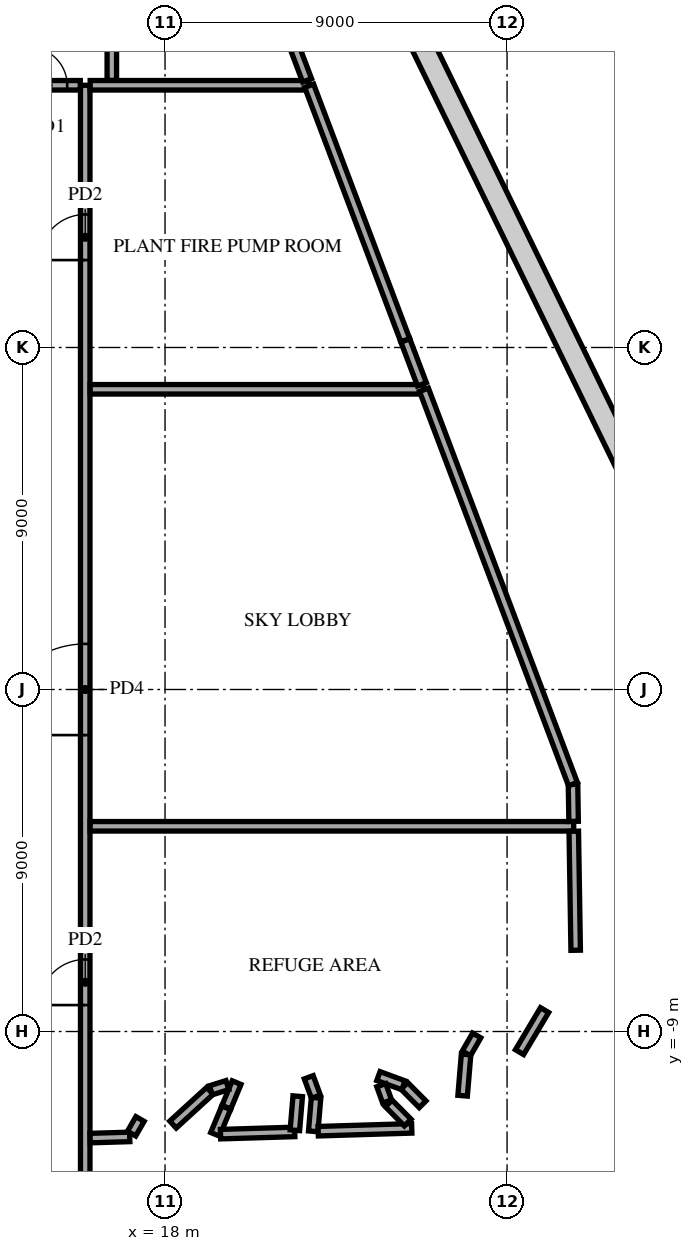
"""IFC4 building model, lengths in metres.
Left out: names, types, materials, properties, quantities, classifications, styles, units other than length and angle.
Written with IfcOpenShell. Run it as: python <this file> out.ifc"""

import sys

from ifc_helpers import new_model, si_unit, direction, frame, frame_2d, origin, place, context, subcontext, project, spatial, rectangle, extrude, element, fill, save


model = new_model("IFC4")
c1 = context("Model", 3, precision=1e-05, world=origin(), true_north=direction((0.0, 1.0)))
c2 = subcontext(c1, "Body", "Model", "MODEL_VIEW")
j1 = project(units=[si_unit("LENGTHUNIT", "METRE"), si_unit("PLANEANGLEUNIT", "RADIAN")], contexts=[c1])
p1 = place(None, origin())
s1 = spatial("IfcSite", under=j1, at=p1, CompositionType="ELEMENT")
p2 = place(p1, origin())
s2 = spatial("IfcBuilding", under=s1, at=p2, CompositionType="ELEMENT")
p3 = place(p2, frame((0.0, 0.0, 130.1)))
s3 = spatial("IfcBuildingStorey", under=s2, at=p3, CompositionType="ELEMENT", Elevation=130.1)
p4 = place(p3, frame((15.9, -13.805, 0.0), z_axis=(0.0, 0.0, 1.0), x_axis=(0.0, 1.0, 0.0)))
e1 = element("IfcWall", 1, at=p4, inside=s3, PredefinedType="PARTITIONING", context=c2, shape_type="SweptSolid", body=[
    extrude(rectangle(XDim=29.705, YDim=0.25, at=frame_2d((14.852, 0.0))), origin(), (0.0, 0.0, 1.0), 4.08),
])
p5 = place(p4, frame((25.105, 0.0, 0.0)))
e2 = element("IfcOpeningElement", 2, at=p5, cuts=e1, PredefinedType="OPENING", context=c2, shape_type="SweptSolid", body=[
    extrude(rectangle(XDim=1.2, YDim=2.1, at=frame_2d((0.6, 1.05))), frame((0.0, 0.135, 0.0), z_axis=(0.0, -1.0, 0.0), x_axis=(1.0, 0.0, 0.0)), (0.0, 0.0, 1.0), 0.27),
])
p6 = place(p4, frame((12.605, 0.0, 0.0)))
e3 = element("IfcOpeningElement", 3, at=p6, cuts=e1, PredefinedType="OPENING", context=c2, shape_type="SweptSolid", body=[
    extrude(rectangle(XDim=2.4, YDim=2.4, at=frame_2d((1.2, 1.2))), frame((0.0, 0.135, 0.0), z_axis=(0.0, -1.0, 0.0), x_axis=(1.0, 0.0, 0.0)), (0.0, 0.0, 1.0), 0.27),
])
p7 = place(p4, frame((5.5, 0.0, 0.0)))
e4 = element("IfcOpeningElement", 4, at=p7, cuts=e1, PredefinedType="OPENING", context=c2, shape_type="SweptSolid", body=[
    extrude(rectangle(XDim=1.2, YDim=2.1, at=frame_2d((0.6, 1.05))), frame((0.0, 0.135, 0.0), z_axis=(0.0, -1.0, 0.0), x_axis=(1.0, 0.0, 0.0)), (0.0, 0.0, 1.0), 0.27),
])
p8 = place(p3, frame((16.03, -11.805, 0.0), z_axis=(0.0, 0.0, 1.0), x_axis=(0.999542468894, 0.030246534949, 0.0)))
e5 = element("IfcWall", 5, at=p8, inside=s3, PredefinedType="PARTITIONING", context=c2, shape_type="SweptSolid", body=[
    extrude(rectangle(XDim=1.041, YDim=0.25, at=frame_2d((0.521, 0.0))), origin(), (0.0, 0.0, 1.0), 4.63),
])
p9 = place(p3, frame((19.318, -11.706, 0.0), z_axis=(0.0, 0.0, 1.0), x_axis=(0.383813679538, 0.923410558419, 0.0)))
e6 = element("IfcWall", 6, at=p9, inside=s3, PredefinedType="PARTITIONING", context=c2, shape_type="SweptSolid", body=[
    extrude(rectangle(XDim=0.757, YDim=0.25, at=frame_2d((0.378, 0.0))), origin(), (0.0, 0.0, 1.0), 5.2),
])
p10 = place(p3, frame((19.46, -11.701, 0.0), z_axis=(0.0, 0.0, 1.0), x_axis=(0.999542439642, 0.030247501612, 0.0)))
e7 = element("IfcWall", 7, at=p10, inside=s3, PredefinedType="PARTITIONING", context=c2, shape_type="SweptSolid", body=[
    extrude(rectangle(XDim=1.953, YDim=0.25, at=frame_2d((0.977, 0.0))), origin(), (0.0, 0.0, 1.0), 4.63),
])
p11 = place(p3, frame((21.9, -11.627, 0.0), z_axis=(0.0, 0.0, 1.0), x_axis=(0.083683339476, 0.99649239771, 0.0)))
e8 = element("IfcWall", 8, at=p11, inside=s3, PredefinedType="PARTITIONING", context=c2, shape_type="SweptSolid", body=[
    extrude(rectangle(XDim=0.887, YDim=0.25, at=frame_2d((0.443, 0.0))), origin(), (0.0, 0.0, 1.0), 5.2),
])
p12 = place(p3, frame((22.031, -11.623, 0.0), z_axis=(0.0, 0.0, 1.0), x_axis=(0.999545895718, 0.03013307738, 0.0)))
e9 = element("IfcWall", 9, at=p12, inside=s3, PredefinedType="PARTITIONING", context=c2, shape_type="SweptSolid", body=[
    extrude(rectangle(XDim=2.463, YDim=0.25, at=frame_2d((1.231, 0.0))), origin(), (0.0, 0.0, 1.0), 5.2),
])
p13 = place(p3, frame((17.12, -11.687, 0.0), z_axis=(0.0, 0.0, 1.0), x_axis=(0.498150847944, 0.867090383232, 0.0)))
e10 = element("IfcWall", 10, at=p13, inside=s3, PredefinedType="PARTITIONING", context=c2, shape_type="SweptSolid", body=[
    extrude(rectangle(XDim=0.444, YDim=0.25, at=frame_2d((0.222, 0.0))), origin(), (0.0, 0.0, 1.0), 5.2),
])
p14 = place(p3, frame((19.614, -10.993, 0.0), z_axis=(0.0, 0.0, 1.0), x_axis=(0.383898575086, 0.923375267184, 0.0)))
e11 = element("IfcWall", 11, at=p14, inside=s3, PredefinedType="PARTITIONING", context=c2, shape_type="SweptSolid", body=[
    extrude(rectangle(XDim=0.701, YDim=0.25, at=frame_2d((0.351, 0.0))), origin(), (0.0, 0.0, 1.0), 5.2),
])
p15 = place(p3, frame((24.298, -10.431, 0.0), z_axis=(0.0, 0.0, 1.0), x_axis=(0.704233858662, -0.709968078377, 0.0)))
e12 = element("IfcWall", 12, at=p15, inside=s3, PredefinedType="PARTITIONING", context=c2, shape_type="SweptSolid", body=[
    extrude(rectangle(XDim=0.681, YDim=0.25, at=frame_2d((0.341, 0.0))), origin(), (0.0, 0.0, 1.0), 5.2),
])
p16 = place(p3, frame((23.887, -10.893, 0.0), z_axis=(0.0, 0.0, 1.0), x_axis=(0.704347371504, -0.709855464341, 0.0)))
e13 = element("IfcWall", 13, at=p16, inside=s3, PredefinedType="PARTITIONING", context=c2, shape_type="SweptSolid", body=[
    extrude(rectangle(XDim=0.709, YDim=0.25, at=frame_2d((0.354, 0.0))), origin(), (0.0, 0.0, 1.0), 5.2),
])
p17 = place(p3, frame((21.782, -10.204, 0.0), z_axis=(0.0, 0.0, 1.0), x_axis=(0.34516449371, -0.938542205914, 0.0)))
e14 = element("IfcWall", 14, at=p17, inside=s3, PredefinedType="PARTITIONING", context=c2, shape_type="SweptSolid", body=[
    extrude(rectangle(XDim=0.544, YDim=0.25, at=frame_2d((0.272, 0.0))), origin(), (0.0, 0.0, 1.0), 5.2),
])
p18 = place(p3, frame((21.417, -11.598, 0.0), z_axis=(0.0, 0.0, 1.0), x_axis=(0.083697651562, 0.996491195708, 0.0)))
e15 = element("IfcWall", 15, at=p18, inside=s3, PredefinedType="PARTITIONING", context=c2, shape_type="SweptSolid", body=[
    extrude(rectangle(XDim=0.898, YDim=0.25, at=frame_2d((0.449, 0.0))), origin(), (0.0, 0.0, 1.0), 5.2),
])
p19 = place(p3, frame((18.21, -11.449, 0.0), z_axis=(0.0, 0.0, 1.0), x_axis=(0.738131795396, 0.674656544195, 0.0)))
e16 = element("IfcWall", 16, at=p19, inside=s3, PredefinedType="PARTITIONING", context=c2, shape_type="SweptSolid", body=[
    extrude(rectangle(XDim=1.315, YDim=0.25, at=frame_2d((0.658, 0.0))), origin(), (0.0, 0.0, 1.0), 5.2),
])
p20 = place(p3, frame((23.615, -10.173, 0.0), z_axis=(0.0, 0.0, 1.0), x_axis=(0.938372825887, -0.345624709238, 0.0)))
e17 = element("IfcWall", 17, at=p20, inside=s3, PredefinedType="PARTITIONING", context=c2, shape_type="SweptSolid", body=[
    extrude(rectangle(XDim=0.701, YDim=0.25, at=frame_2d((0.351, 0.0))), origin(), (0.0, 0.0, 1.0), 5.2),
])
for number, where, z_axis, x_axis in (
    (18, (19.206, -10.547, 0.0), (0.0, 0.0, 1.0), (0.954, 0.299, 0.0)),
    (19, (23.69, -10.413, 0.0), (0.0, 0.0, 1.0), (0.339, -0.941, 0.0)),
):
    element("IfcWall", number, at=place(p3, frame(where, z_axis=z_axis, x_axis=x_axis)), inside=s3, PredefinedType="PARTITIONING", context=c2, shape_type="SweptSolid", body=[
        extrude(rectangle(XDim=0.455, YDim=0.25, at=frame_2d((0.228, 0.0))), origin(), (0.0, 0.0, 1.0), 5.2),
    ])
p21 = place(p3, frame((25.831, -10.689, 0.0), z_axis=(0.0, 0.0, 1.0), x_axis=(0.083416627051, 0.996514759716, 0.0)))
e20 = element("IfcWall", 20, at=p21, inside=s3, PredefinedType="PARTITIONING", context=c2, shape_type="SweptSolid", body=[
    extrude(rectangle(XDim=1.089, YDim=0.25, at=frame_2d((0.544, 0.0))), origin(), (0.0, 0.0, 1.0), 5.2),
])
p22 = place(p3, frame((25.93, -9.576, 0.0), z_axis=(0.0, 0.0, 1.0), x_axis=(0.49642893732, 0.868077364174, 0.0)))
e21 = element("IfcWall", 21, at=p22, inside=s3, PredefinedType="PARTITIONING", context=c2, shape_type="SweptSolid", body=[
    extrude(rectangle(XDim=0.544, YDim=0.25, at=frame_2d((0.272, 0.0))), origin(), (0.0, 0.0, 1.0), 5.2),
])
p23 = place(p3, frame((27.328, -9.543, 0.0), z_axis=(0.0, 0.0, 1.0), x_axis=(0.511956966552, 0.859011096784, 0.0)))
e22 = element("IfcWall", 22, at=p23, inside=s3, PredefinedType="PARTITIONING", context=c2, shape_type="SweptSolid", body=[
    extrude(rectangle(XDim=1.288, YDim=0.25, at=frame_2d((0.644, 0.0))), origin(), (0.0, 0.0, 1.0), 5.2),
])
p24 = place(p3, frame((16.03, -3.6, 0.0), z_axis=(0.0, 0.0, 1.0), x_axis=(1.0, 0.0, 0.0)))
e23 = element("IfcWall", 23, at=p24, inside=s3, PredefinedType="PARTITIONING", context=c2, shape_type="SweptSolid", body=[
    extrude(rectangle(XDim=12.723, YDim=0.25, at=frame_2d((6.362, 0.0))), origin(), (0.0, 0.0, 1.0), 4.63),
])
p25 = place(p3, frame((28.755, -3.729, 0.0), z_axis=(0.0, 0.0, 1.0), x_axis=(0.016052798377, -0.99987114553, 0.0)))
e24 = element("IfcWall", 24, at=p25, inside=s3, PredefinedType="PARTITIONING", context=c2, shape_type="SweptSolid", body=[
    extrude(rectangle(XDim=3.133, YDim=0.25, at=frame_2d((1.566, 0.0))), origin(), (0.0, 0.0, 1.0), 4.08),
])
p26 = place(p3, frame((28.735, -2.496, 0.0), z_axis=(0.0, 0.0, 1.0), x_axis=(0.016034019694, -0.999871446843, 0.0)))
e25 = element("IfcWall", 25, at=p26, inside=s3, PredefinedType="PARTITIONING", context=c2, shape_type="SweptSolid", body=[
    extrude(rectangle(XDim=0.975, YDim=0.25, at=frame_2d((0.487, 0.0))), origin(), (0.0, 0.0, 1.0), 5.2),
])
p27 = place(p3, frame((16.03, 7.9, 0.0), z_axis=(0.0, 0.0, 1.0), x_axis=(1.0, 0.0, 0.0)))
e26 = element("IfcWall", 26, at=p27, inside=s3, PredefinedType="PARTITIONING", context=c2, shape_type="SweptSolid", body=[
    extrude(rectangle(XDim=8.779, YDim=0.25, at=frame_2d((4.389, 0.0))), origin(), (0.0, 0.0, 1.0), 5.2),
])
p28 = place(p3, frame((24.814, 7.887, 0.0), z_axis=(0.0, 0.0, 1.0), x_axis=(0.353334226632, -0.935497153545, 0.0)))
e27 = element("IfcWall", 27, at=p28, inside=s3, PredefinedType="PARTITIONING", context=c2, shape_type="SweptSolid", body=[
    extrude(rectangle(XDim=11.093, YDim=0.25, at=frame_2d((5.546, 0.0))), origin(), (0.0, 0.0, 1.0), 4.63),
])
p29 = place(p3, frame((24.323, 9.187, 0.0), z_axis=(0.0, 0.0, 1.0), x_axis=(0.353350663063, -0.935490945393, 0.0)))
e28 = element("IfcWall", 28, at=p29, inside=s3, PredefinedType="PARTITIONING", context=c2, shape_type="SweptSolid", body=[
    extrude(rectangle(XDim=1.237, YDim=0.25, at=frame_2d((0.618, 0.0))), origin(), (0.0, 0.0, 1.0), 5.2),
])
p30 = place(p3, frame((14.08, 15.9, 0.0), z_axis=(0.0, 0.0, 1.0), x_axis=(1.0, 0.0, 0.0)))
e29 = element("IfcWall", 29, at=p30, inside=s3, PredefinedType="PARTITIONING", context=c2, shape_type="SweptSolid", body=[
    extrude(rectangle(XDim=1.69, YDim=0.25, at=frame_2d((0.845, 0.0))), origin(), (0.0, 0.0, 1.0), 4.63),
])
p31 = place(p30, frame((0.345, 0.0, 0.0)))
e30 = element("IfcOpeningElement", 30, at=p31, cuts=e29, PredefinedType="OPENING", context=c2, shape_type="SweptSolid", body=[
    extrude(rectangle(XDim=1.0, YDim=2.1, at=frame_2d((0.5, 1.05))), frame((0.0, 0.135, 0.0), z_axis=(0.0, -1.0, 0.0), x_axis=(1.0, 0.0, 0.0)), (0.0, 0.0, 1.0), 0.27),
])
p32 = place(p3, frame((16.03, 15.9, 0.0), z_axis=(0.0, 0.0, 1.0), x_axis=(1.0, 0.0, 0.0)))
e31 = element("IfcWall", 31, at=p32, inside=s3, PredefinedType="PARTITIONING", context=c2, shape_type="SweptSolid", body=[
    extrude(rectangle(XDim=5.757, YDim=0.25, at=frame_2d((2.879, 0.0))), origin(), (0.0, 0.0, 1.0), 4.63),
])
p33 = place(p3, frame((21.792, 15.887, 0.0), z_axis=(0.0, 0.0, 1.0), x_axis=(0.353316978095, -0.935503668079, 0.0)))
e32 = element("IfcWall", 32, at=p33, inside=s3, PredefinedType="PARTITIONING", context=c2, shape_type="SweptSolid", body=[
    extrude(rectangle(XDim=7.157, YDim=0.25, at=frame_2d((3.578, 0.0))), origin(), (0.0, 0.0, 1.0), 4.63),
])
p34 = place(p3, frame((20.006, 20.616, 0.0), z_axis=(0.0, 0.0, 1.0), x_axis=(0.353332775747, -0.935497701538, 0.0)))
e33 = element("IfcWall", 33, at=p34, inside=s3, PredefinedType="PARTITIONING", context=c2, shape_type="SweptSolid", body=[
    extrude(rectangle(XDim=4.902, YDim=0.25, at=frame_2d((2.451, 0.0))), origin(), (0.0, 0.0, 1.0), 4.172),
])
p35 = place(p3, frame((16.6, 16.03, 0.0), z_axis=(0.0, 0.0, 1.0), x_axis=(0.0, 1.0, 0.0)))
e34 = element("IfcWall", 34, at=p35, inside=s3, PredefinedType="PARTITIONING", context=c2, shape_type="SweptSolid", body=[
    extrude(rectangle(XDim=6.567, YDim=0.25, at=frame_2d((3.283, 0.0))), origin(), (0.0, 0.0, 1.0), 4.63),
])
p36 = place(p35, frame((2.629, 0.0, 0.0)))
e35 = element("IfcOpeningElement", 35, at=p36, cuts=e34, PredefinedType="OPENING", context=c2, shape_type="SweptSolid", body=[
    extrude(rectangle(XDim=1.2, YDim=2.1, at=frame_2d((0.6, 1.05))), frame((0.0, 0.135, 0.0), z_axis=(0.0, -1.0, 0.0), x_axis=(1.0, 0.0, 0.0)), (0.0, 0.0, 1.0), 0.27),
])
p37 = place(p3, frame((36.722, -7.541, 0.0), z_axis=(0.0, 0.0, 1.0), x_axis=(-0.438370098475, 0.898794557596, 0.0)))
e36 = element("IfcWall", 36, at=p37, inside=s3, PredefinedType="STANDARD", context=c2, shape_type="SweptSolid", body=[
    extrude(rectangle(XDim=45.376, YDim=0.6, at=frame_2d((22.688, 0.0))), origin(), (0.0, 0.0, 1.0), 5.2),
])
p38 = place(p37, frame((1.163, 0.0, 0.6)))
e37 = element("IfcOpeningElement", 37, at=p38, cuts=e36, PredefinedType="OPENING", context=c2, shape_type="SweptSolid", body=[
    extrude(rectangle(XDim=2.1, YDim=4.15, at=frame_2d((1.05, 2.075))), frame((0.0, 0.31, 0.0), z_axis=(0.0, -1.0, 0.0), x_axis=(1.0, 0.0, 0.0)), (0.0, 0.0, 1.0), 0.62),
])
p39 = place(p37, frame((5.651, 0.0, 0.6)))
e38 = element("IfcOpeningElement", 38, at=p39, cuts=e36, PredefinedType="OPENING", context=c2, shape_type="SweptSolid", body=[
    extrude(rectangle(XDim=2.1, YDim=4.15, at=frame_2d((1.05, 2.075))), frame((0.0, 0.31, 0.0), z_axis=(0.0, -1.0, 0.0), x_axis=(1.0, 0.0, 0.0)), (0.0, 0.0, 1.0), 0.62),
])
p40 = place(p37, frame((37.501, 0.0, 0.6)))
e39 = element("IfcOpeningElement", 39, at=p40, cuts=e36, PredefinedType="OPENING", context=c2, shape_type="SweptSolid", body=[
    extrude(rectangle(XDim=2.1, YDim=4.15, at=frame_2d((1.05, 2.075))), frame((0.0, 0.31, 0.0), z_axis=(0.0, -1.0, 0.0), x_axis=(1.0, 0.0, 0.0)), (0.0, 0.0, 1.0), 0.62),
])
p41 = place(p37, frame((42.051, 0.0, 0.6)))
e40 = element("IfcOpeningElement", 40, at=p41, cuts=e36, PredefinedType="OPENING", context=c2, shape_type="SweptSolid", body=[
    extrude(rectangle(XDim=2.1, YDim=4.15, at=frame_2d((1.05, 2.075))), frame((0.0, 0.31, 0.0), z_axis=(0.0, -1.0, 0.0), x_axis=(1.0, 0.0, 0.0)), (0.0, 0.0, 1.0), 0.62),
])
p42 = place(p5, origin())
e41 = element("IfcDoor", 41, at=p42, inside=s3, OperationType="SINGLE_SWING_LEFT", PredefinedType="DOOR", context=c2, shape_type="SweptSolid", body=[
    extrude(rectangle(XDim=1.2, YDim=2.1, at=frame_2d((0.6, 1.05))), frame((0.0, 0.025, 0.0), z_axis=(0.0, -1.0, 0.0), x_axis=(1.0, 0.0, 0.0)), (0.0, 0.0, 1.0), 0.05),
])
fill(e2, e41)
p43 = place(p6, origin())
e42 = element("IfcDoor", 42, at=p43, inside=s3, OperationType="SINGLE_SWING_LEFT", PredefinedType="DOOR", context=c2, shape_type="SweptSolid", body=[
    extrude(rectangle(XDim=2.4, YDim=2.4, at=frame_2d((1.2, 1.2))), frame((0.0, 0.025, 0.0), z_axis=(0.0, -1.0, 0.0), x_axis=(1.0, 0.0, 0.0)), (0.0, 0.0, 1.0), 0.05),
])
fill(e3, e42)
p44 = place(p7, origin())
e43 = element("IfcDoor", 43, at=p44, inside=s3, OperationType="SINGLE_SWING_LEFT", PredefinedType="DOOR", context=c2, shape_type="SweptSolid", body=[
    extrude(rectangle(XDim=1.2, YDim=2.1, at=frame_2d((0.6, 1.05))), frame((0.0, 0.025, 0.0), z_axis=(0.0, -1.0, 0.0), x_axis=(1.0, 0.0, 0.0)), (0.0, 0.0, 1.0), 0.05),
])
fill(e4, e43)
p45 = place(p31, origin())
e44 = element("IfcDoor", 44, at=p45, inside=s3, OperationType="SINGLE_SWING_LEFT", PredefinedType="DOOR", context=c2, shape_type="SweptSolid", body=[
    extrude(rectangle(XDim=1.0, YDim=2.1, at=frame_2d((0.5, 1.05))), frame((0.0, 0.025, 0.0), z_axis=(0.0, -1.0, 0.0), x_axis=(1.0, 0.0, 0.0)), (0.0, 0.0, 1.0), 0.05),
])
fill(e30, e44)
save(model, sys.argv[1])
